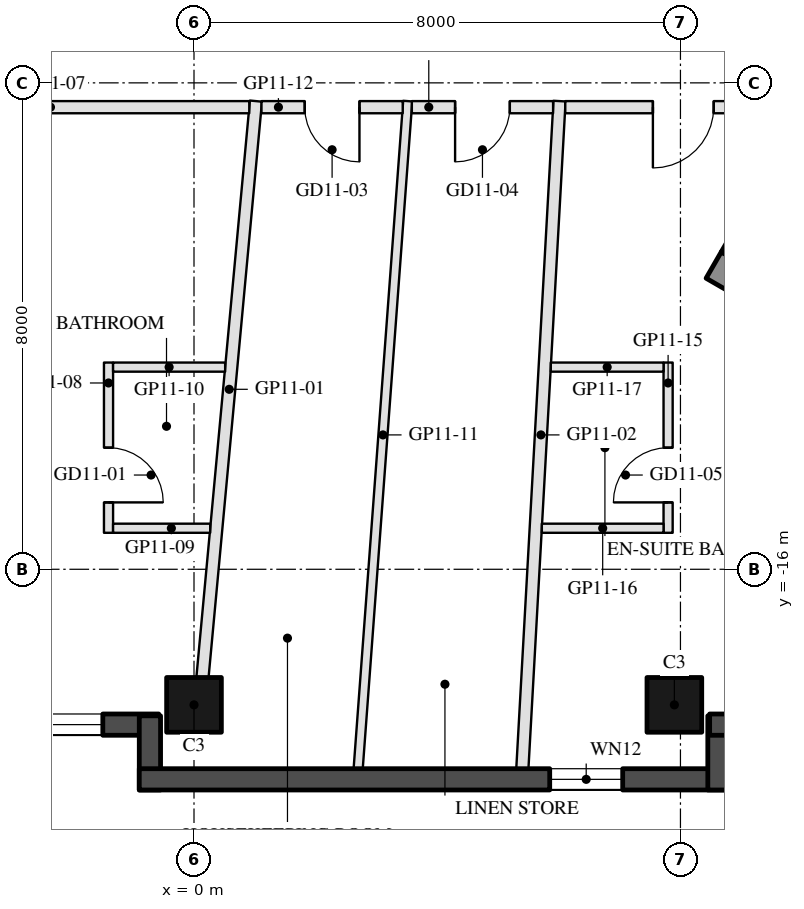
"""IFC4 building model, lengths in metres.
Left out: names, types, materials, properties, quantities, classifications, styles, units other than length and angle.
Written with IfcOpenShell. Run it as: python <this file> out.ifc"""

import sys

from ifc_helpers import new_model, si_unit, direction, frame, frame_2d, origin, origin_2d, place, context, subcontext, project, spatial, rectangle, hollow_rectangle, extrude, element, fill, save


model = new_model("IFC4")
c1 = context("Model", 3, precision=1e-05, world=origin(), true_north=direction((0.0, 1.0)))
c2 = subcontext(c1, "Body", "Model", "MODEL_VIEW")
j1 = project(units=[si_unit("LENGTHUNIT", "METRE"), si_unit("PLANEANGLEUNIT", "RADIAN")], contexts=[c1])
p1 = place(None, origin())
s1 = spatial("IfcSite", under=j1, at=p1, CompositionType="ELEMENT")
p2 = place(p1, origin())
s2 = spatial("IfcBuilding", under=s1, at=p2, CompositionType="ELEMENT")
p3 = place(p2, frame((0.0, 0.0, 127.9)))
s3 = spatial("IfcBuildingStorey", under=s2, at=p3, CompositionType="ELEMENT", Elevation=127.9)
for number, where, z_axis, x_axis in (
    (1, (0.0, -18.23, 0.0), (0.0, 0.0, 1.0), (-1.0, 0.0, 0.0)),
    (2, (7.9, -18.23, 0.0), (0.0, 0.0, 1.0), (-1.0, 0.0, 0.0)),
):
    element("IfcColumn", number, at=place(p3, frame(where, z_axis=z_axis, x_axis=x_axis)), inside=s3, PredefinedType="COLUMN", context=c2, shape_type="SweptSolid", body=[
        extrude(hollow_rectangle(XDim=0.9, YDim=0.9, WallThickness=0.04, at=origin_2d()), origin(), (0.0, 0.0, 1.0), 3.7),
    ])
p4 = place(p3, frame((-7.32, -18.555, 0.0), z_axis=(0.0, 0.0, 1.0), x_axis=(1.0, 0.0, 0.0)))
e3 = element("IfcWall", 3, at=p4, inside=s3, PredefinedType="SOLIDWALL", context=c2, shape_type="SweptSolid", body=[
    extrude(rectangle(XDim=6.74, YDim=0.35, at=frame_2d((3.37, 0.0))), origin(), (0.0, 0.0, 1.0), 3.45),
])
p5 = place(p4, frame((0.32, 0.0, 0.3)))
e4 = element("IfcOpeningElement", 4, at=p5, cuts=e3, PredefinedType="OPENING", context=c2, shape_type="SweptSolid", body=[
    extrude(rectangle(XDim=2.6, YDim=2.65, at=frame_2d((1.3, 1.325))), frame((0.0, 0.185, 0.0), z_axis=(0.0, -1.0, 0.0), x_axis=(1.0, 0.0, 0.0)), (0.0, 0.0, 1.0), 0.37),
])
p6 = place(p4, frame((3.22, 0.0, 0.3)))
e5 = element("IfcOpeningElement", 5, at=p6, cuts=e3, PredefinedType="OPENING", context=c2, shape_type="SweptSolid", body=[
    extrude(rectangle(XDim=2.6, YDim=2.65, at=frame_2d((1.3, 1.325))), frame((0.0, 0.185, 0.0), z_axis=(0.0, -1.0, 0.0), x_axis=(1.0, 0.0, 0.0)), (0.0, 0.0, 1.0), 0.37),
])
p7 = place(p3, frame((-0.725, -18.41, 0.0), z_axis=(0.0, 0.0, 1.0), x_axis=(0.0, -1.0, 0.0)))
e6 = element("IfcWall", 6, at=p7, inside=s3, PredefinedType="SOLIDWALL", context=c2, shape_type="SweptSolid", body=[
    extrude(rectangle(XDim=1.22, YDim=0.35, at=frame_2d((0.61, 0.0))), origin(), (0.0, 0.0, 1.0), 3.45),
])
p8 = place(p3, frame((-0.9, -19.455, 0.0), z_axis=(0.0, 0.0, 1.0), x_axis=(1.0, 0.0, 0.0)))
e7 = element("IfcWall", 7, at=p8, inside=s3, PredefinedType="SOLIDWALL", context=c2, shape_type="SweptSolid", body=[
    extrude(rectangle(XDim=9.7, YDim=0.35, at=frame_2d((4.85, 0.0))), origin(), (0.0, 0.0, 1.0), 3.45),
])
p9 = place(p8, frame((6.75, 0.0, 0.3)))
e8 = element("IfcOpeningElement", 8, at=p9, cuts=e7, PredefinedType="OPENING", context=c2, shape_type="SweptSolid", body=[
    extrude(rectangle(XDim=1.2, YDim=2.65, at=frame_2d((0.6, 1.325))), frame((0.0, 0.185, 0.0), z_axis=(0.0, -1.0, 0.0), x_axis=(1.0, 0.0, 0.0)), (0.0, 0.0, 1.0), 0.37),
])
p10 = place(p3, frame((8.625, -19.63, 0.0), z_axis=(0.0, 0.0, 1.0), x_axis=(0.0, 1.0, 0.0)))
e9 = element("IfcWall", 9, at=p10, inside=s3, PredefinedType="SOLIDWALL", context=c2, shape_type="SweptSolid", body=[
    extrude(rectangle(XDim=1.22, YDim=0.35, at=frame_2d((0.61, 0.0))), origin(), (0.0, 0.0, 1.0), 3.45),
])
p11 = place(p3, frame((8.48, -18.555, 0.0), z_axis=(0.0, 0.0, 1.0), x_axis=(1.0, 0.0, 0.0)))
e10 = element("IfcWall", 10, at=p11, inside=s3, PredefinedType="SOLIDWALL", context=c2, shape_type="SweptSolid", body=[
    extrude(rectangle(XDim=6.74, YDim=0.35, at=frame_2d((3.37, 0.0))), origin(), (0.0, 0.0, 1.0), 3.45),
])
p12 = place(p11, frame((0.32, 0.0, 0.0)))
e11 = element("IfcOpeningElement", 11, at=p12, cuts=e10, PredefinedType="OPENING", context=c2, shape_type="SweptSolid", body=[
    extrude(rectangle(XDim=2.4, YDim=2.4, at=frame_2d((1.2, 1.2))), frame((0.0, 0.185, 0.0), z_axis=(0.0, -1.0, 0.0), x_axis=(1.0, 0.0, 0.0)), (0.0, 0.0, 1.0), 0.37),
])
p13 = place(p11, frame((3.02, 0.0, 0.3)))
e12 = element("IfcOpeningElement", 12, at=p13, cuts=e10, PredefinedType="OPENING", context=c2, shape_type="SweptSolid", body=[
    extrude(rectangle(XDim=2.9, YDim=2.65, at=frame_2d((1.45, 1.325))), frame((0.0, 0.185, 0.0), z_axis=(0.0, -1.0, 0.0), x_axis=(1.0, 0.0, 0.0)), (0.0, 0.0, 1.0), 0.37),
])
p14 = place(p3, frame((8.547, -10.997, 0.0), z_axis=(0.0, 0.0, 1.0), x_axis=(0.866025009528, -0.500000682871, 0.0)))
e13 = element("IfcWall", 13, at=p14, inside=s3, PredefinedType="SHEAR", context=c2, shape_type="SweptSolid", body=[
    extrude(rectangle(XDim=14.837, YDim=0.5, at=frame_2d((7.418, 0.0))), origin(), (0.0, 0.0, 1.0), 3.45),
])
p15 = place(p3, frame((8.845, -10.88, 0.0), z_axis=(0.0, 0.0, 1.0), x_axis=(0.500004234368, 0.866022959057, 0.0)))
e14 = element("IfcWall", 14, at=p15, inside=s3, PredefinedType="SHEAR", context=c2, shape_type="SweptSolid", body=[
    extrude(rectangle(XDim=10.0, YDim=0.4, at=frame_2d((5.0, 0.0))), origin(), (0.0, 0.0, 1.0), 3.45),
])
p16 = place(p15, frame((3.55, 0.0, 0.0)))
e15 = element("IfcOpeningElement", 15, at=p16, cuts=e14, PredefinedType="OPENING", context=c2, shape_type="SweptSolid", body=[
    extrude(rectangle(XDim=1.1, YDim=2.1, at=frame_2d((0.55, 1.05))), frame((0.0, 0.21, 0.0), z_axis=(0.0, -1.0, 0.0), x_axis=(1.0, 0.0, 0.0)), (0.0, 0.0, 1.0), 0.42),
])
p17 = place(p15, frame((5.85, 0.0, 0.0)))
e16 = element("IfcOpeningElement", 16, at=p17, cuts=e14, PredefinedType="OPENING", context=c2, shape_type="SweptSolid", body=[
    extrude(rectangle(XDim=1.4, YDim=2.1, at=frame_2d((0.7, 1.05))), frame((0.0, 0.21, 0.0), z_axis=(0.0, -1.0, 0.0), x_axis=(1.0, 0.0, 0.0)), (0.0, 0.0, 1.0), 0.42),
])
p18 = place(p3, frame((0.139, -17.78, 0.0), z_axis=(0.0, 0.0, 1.0), x_axis=(0.092366768961, 0.995725052407, 0.0)))
e17 = element("IfcWall", 17, at=p18, inside=s3, PredefinedType="PARTITIONING", context=c2, shape_type="SweptSolid", body=[
    extrude(rectangle(XDim=9.521, YDim=0.2, at=frame_2d((4.76, 0.0))), origin(), (0.0, 0.0, 1.0), 2.76),
])
p19 = place(p3, frame((5.4, -19.28, 0.0), z_axis=(0.0, 0.0, 1.0), x_axis=(0.055568385591, 0.998454883569, 0.0)))
e18 = element("IfcWall", 18, at=p19, inside=s3, PredefinedType="PARTITIONING", context=c2, shape_type="SweptSolid", body=[
    extrude(rectangle(XDim=10.997, YDim=0.2, at=frame_2d((5.499, 0.0))), origin(), (0.0, 0.0, 1.0), 2.86),
])
p20 = place(p3, frame((0.909, -8.4, 0.0), z_axis=(0.0, 0.0, 1.0), x_axis=(-1.0, 0.0, 0.0)))
e19 = element("IfcWall", 19, at=p20, inside=s3, PredefinedType="PARTITIONING", context=c2, shape_type="SweptSolid", body=[
    extrude(rectangle(XDim=10.897, YDim=0.2, at=frame_2d((5.448, 0.0))), origin(), (0.0, 0.0, 1.0), 2.76),
])
p21 = place(p20, frame((4.948, 0.0, 0.0)))
e20 = element("IfcOpeningElement", 20, at=p21, cuts=e19, PredefinedType="OPENING", context=c2, shape_type="SweptSolid", body=[
    extrude(rectangle(XDim=1.0, YDim=2.1, at=frame_2d((0.5, 1.05))), frame((0.0, 0.11, 0.0), z_axis=(0.0, -1.0, 0.0), x_axis=(1.0, 0.0, 0.0)), (0.0, 0.0, 1.0), 0.22),
])
p22 = place(p3, frame((-1.406, -12.6, 0.0), z_axis=(0.0, 0.0, 1.0), x_axis=(0.0, -1.0, 0.0)))
e21 = element("IfcWall", 21, at=p22, inside=s3, PredefinedType="PARTITIONING", context=c2, shape_type="SweptSolid", body=[
    extrude(rectangle(XDim=2.8, YDim=0.15, at=frame_2d((1.4, 0.0))), origin(), (0.0, 0.0, 1.0), 3.45),
])
p23 = place(p22, frame((1.4, 0.0, 0.0)))
e22 = element("IfcOpeningElement", 22, at=p23, cuts=e21, PredefinedType="OPENING", context=c2, shape_type="SweptSolid", body=[
    extrude(rectangle(XDim=0.9, YDim=2.1, at=frame_2d((0.45, 1.05))), frame((0.0, 0.085, 0.0), z_axis=(0.0, -1.0, 0.0), x_axis=(1.0, 0.0, 0.0)), (0.0, 0.0, 1.0), 0.17),
])
p24 = place(p3, frame((-1.331, -15.325, 0.0), z_axis=(0.0, 0.0, 1.0), x_axis=(1.0, 0.0, 0.0)))
e23 = element("IfcWall", 23, at=p24, inside=s3, PredefinedType="PARTITIONING", context=c2, shape_type="SweptSolid", body=[
    extrude(rectangle(XDim=1.597, YDim=0.15, at=frame_2d((0.799, 0.0))), origin(), (0.0, 0.0, 1.0), 2.76),
])
p25 = place(p3, frame((-1.331, -12.675, 0.0), z_axis=(0.0, 0.0, 1.0), x_axis=(1.0, 0.0, 0.0)))
e24 = element("IfcWall", 24, at=p25, inside=s3, PredefinedType="PARTITIONING", context=c2, shape_type="SweptSolid", body=[
    extrude(rectangle(XDim=1.843, YDim=0.15, at=frame_2d((0.921, 0.0))), origin(), (0.0, 0.0, 1.0), 2.76),
])
p26 = place(p3, frame((2.7, -19.28, 0.0), z_axis=(0.0, 0.0, 1.0), x_axis=(0.074017071658, 0.997256974457, 0.0)))
e25 = element("IfcWall", 25, at=p26, inside=s3, PredefinedType="PARTITIONING", context=c2, shape_type="SweptSolid", body=[
    extrude(rectangle(XDim=11.01, YDim=0.15, at=frame_2d((5.505, 0.0))), origin(), (0.0, 0.0, 1.0), 2.86),
])
p27 = place(p3, frame((3.432, -8.4, 0.0), z_axis=(0.0, 0.0, 1.0), x_axis=(-1.0, 0.0, 0.0)))
e26 = element("IfcWall", 26, at=p27, inside=s3, PredefinedType="PARTITIONING", context=c2, shape_type="SweptSolid", body=[
    extrude(rectangle(XDim=2.323, YDim=0.2, at=frame_2d((1.161, 0.0))), origin(), (0.0, 0.0, 1.0), 3.45),
])
p28 = place(p27, frame((0.711, 0.0, 0.0)))
e27 = element("IfcOpeningElement", 27, at=p28, cuts=e26, PredefinedType="OPENING", context=c2, shape_type="SweptSolid", body=[
    extrude(rectangle(XDim=0.9, YDim=2.1, at=frame_2d((0.45, 1.05))), frame((0.0, 0.11, 0.0), z_axis=(0.0, -1.0, 0.0), x_axis=(1.0, 0.0, 0.0)), (0.0, 0.0, 1.0), 0.22),
])
p29 = place(p3, frame((5.906, -8.4, 0.0), z_axis=(0.0, 0.0, 1.0), x_axis=(-1.0, 0.0, 0.0)))
e28 = element("IfcWall", 28, at=p29, inside=s3, PredefinedType="PARTITIONING", context=c2, shape_type="SweptSolid", body=[
    extrude(rectangle(XDim=2.323, YDim=0.2, at=frame_2d((1.162, 0.0))), origin(), (0.0, 0.0, 1.0), 2.76),
])
p30 = place(p29, frame((0.711, 0.0, 0.0)))
e29 = element("IfcOpeningElement", 29, at=p30, cuts=e28, PredefinedType="OPENING", context=c2, shape_type="SweptSolid", body=[
    extrude(rectangle(XDim=0.9, YDim=2.1, at=frame_2d((0.45, 1.05))), frame((0.0, 0.11, 0.0), z_axis=(0.0, -1.0, 0.0), x_axis=(1.0, 0.0, 0.0)), (0.0, 0.0, 1.0), 0.22),
])
p31 = place(p3, frame((9.988, -8.4, 0.0), z_axis=(0.0, 0.0, 1.0), x_axis=(-1.0, 0.0, 0.0)))
e30 = element("IfcWall", 30, at=p31, inside=s3, PredefinedType="PARTITIONING", context=c2, shape_type="SweptSolid", body=[
    extrude(rectangle(XDim=3.883, YDim=0.2, at=frame_2d((1.941, 0.0))), origin(), (0.0, 0.0, 1.0), 2.76),
])
p32 = place(p31, frame((1.441, 0.0, 0.0)))
e31 = element("IfcOpeningElement", 31, at=p32, cuts=e30, PredefinedType="OPENING", context=c2, shape_type="SweptSolid", body=[
    extrude(rectangle(XDim=1.0, YDim=2.1, at=frame_2d((0.5, 1.05))), frame((0.0, 0.11, 0.0), z_axis=(0.0, -1.0, 0.0), x_axis=(1.0, 0.0, 0.0)), (0.0, 0.0, 1.0), 0.22),
])
p33 = place(p3, frame((7.797, -15.4, 0.0), z_axis=(0.0, 0.0, 1.0), x_axis=(0.0, 1.0, 0.0)))
e32 = element("IfcWall", 32, at=p33, inside=s3, PredefinedType="PARTITIONING", context=c2, shape_type="SweptSolid", body=[
    extrude(rectangle(XDim=2.8, YDim=0.15, at=frame_2d((1.4, 0.0))), origin(), (0.0, 0.0, 1.0), 2.76),
])
p34 = place(p33, frame((0.5, 0.0, 0.0)))
e33 = element("IfcOpeningElement", 33, at=p34, cuts=e32, PredefinedType="OPENING", context=c2, shape_type="SweptSolid", body=[
    extrude(rectangle(XDim=0.9, YDim=2.1, at=frame_2d((0.45, 1.05))), frame((0.0, 0.085, 0.0), z_axis=(0.0, -1.0, 0.0), x_axis=(1.0, 0.0, 0.0)), (0.0, 0.0, 1.0), 0.17),
])
p35 = place(p3, frame((5.72, -15.325, 0.0), z_axis=(0.0, 0.0, 1.0), x_axis=(1.0, 0.0, 0.0)))
e34 = element("IfcWall", 34, at=p35, inside=s3, PredefinedType="PARTITIONING", context=c2, shape_type="SweptSolid", body=[
    extrude(rectangle(XDim=2.002, YDim=0.15, at=frame_2d((1.001, 0.0))), origin(), (0.0, 0.0, 1.0), 3.45),
])
p36 = place(p3, frame((5.868, -12.675, 0.0), z_axis=(0.0, 0.0, 1.0), x_axis=(1.0, 0.0, 0.0)))
e35 = element("IfcWall", 35, at=p36, inside=s3, PredefinedType="PARTITIONING", context=c2, shape_type="SweptSolid", body=[
    extrude(rectangle(XDim=1.854, YDim=0.15, at=frame_2d((0.927, 0.0))), origin(), (0.0, 0.0, 1.0), 3.45),
])
p37 = place(p6, origin())
e36 = element("IfcWindow", 36, at=p37, inside=s3, PartitioningType="SINGLE_PANEL", PredefinedType="WINDOW", context=c2, shape_type="SweptSolid", body=[
    extrude(rectangle(XDim=2.6, YDim=2.65, at=frame_2d((1.3, 1.325))), frame((0.0, 0.03, 0.0), z_axis=(0.0, -1.0, 0.0), x_axis=(1.0, 0.0, 0.0)), (0.0, 0.0, 1.0), 0.06),
])
fill(e5, e36)
p38 = place(p9, origin())
e37 = element("IfcWindow", 37, at=p38, inside=s3, PartitioningType="SINGLE_PANEL", PredefinedType="WINDOW", context=c2, shape_type="SweptSolid", body=[
    extrude(rectangle(XDim=1.2, YDim=2.65, at=frame_2d((0.6, 1.325))), frame((0.0, 0.03, 0.0), z_axis=(0.0, -1.0, 0.0), x_axis=(1.0, 0.0, 0.0)), (0.0, 0.0, 1.0), 0.06),
])
fill(e8, e37)
p39 = place(p23, origin())
e38 = element("IfcDoor", 38, at=p39, inside=s3, OperationType="SINGLE_SWING_RIGHT", PredefinedType="DOOR", context=c2, shape_type="SweptSolid", body=[
    extrude(rectangle(XDim=0.9, YDim=2.1, at=frame_2d((0.45, 1.05))), frame((0.0, 0.025, 0.0), z_axis=(0.0, -1.0, 0.0), x_axis=(1.0, 0.0, 0.0)), (0.0, 0.0, 1.0), 0.05),
])
fill(e22, e38)
p40 = place(p28, origin())
e39 = element("IfcDoor", 39, at=p40, inside=s3, OperationType="SINGLE_SWING_LEFT", PredefinedType="DOOR", context=c2, shape_type="SweptSolid", body=[
    extrude(rectangle(XDim=0.9, YDim=2.1, at=frame_2d((0.45, 1.05))), frame((0.0, 0.025, 0.0), z_axis=(0.0, -1.0, 0.0), x_axis=(1.0, 0.0, 0.0)), (0.0, 0.0, 1.0), 0.05),
])
fill(e27, e39)
p41 = place(p30, origin())
e40 = element("IfcDoor", 40, at=p41, inside=s3, OperationType="SINGLE_SWING_RIGHT", PredefinedType="DOOR", context=c2, shape_type="SweptSolid", body=[
    extrude(rectangle(XDim=0.9, YDim=2.1, at=frame_2d((0.45, 1.05))), frame((0.0, 0.025, 0.0), z_axis=(0.0, -1.0, 0.0), x_axis=(1.0, 0.0, 0.0)), (0.0, 0.0, 1.0), 0.05),
])
fill(e29, e40)
p42 = place(p34, origin())
e41 = element("IfcDoor", 41, at=p42, inside=s3, OperationType="SINGLE_SWING_LEFT", PredefinedType="DOOR", context=c2, shape_type="SweptSolid", body=[
    extrude(rectangle(XDim=0.9, YDim=2.1, at=frame_2d((0.45, 1.05))), frame((0.0, 0.025, 0.0), z_axis=(0.0, -1.0, 0.0), x_axis=(1.0, 0.0, 0.0)), (0.0, 0.0, 1.0), 0.05),
])
fill(e33, e41)
p43 = place(p32, origin())
e42 = element("IfcDoor", 42, at=p43, inside=s3, OperationType="SINGLE_SWING_RIGHT", PredefinedType="DOOR", context=c2, shape_type="SweptSolid", body=[
    extrude(rectangle(XDim=1.0, YDim=2.1, at=frame_2d((0.5, 1.05))), frame((0.0, 0.025, 0.0), z_axis=(0.0, -1.0, 0.0), x_axis=(1.0, 0.0, 0.0)), (0.0, 0.0, 1.0), 0.05),
])
fill(e31, e42)
save(model, sys.argv[1])
